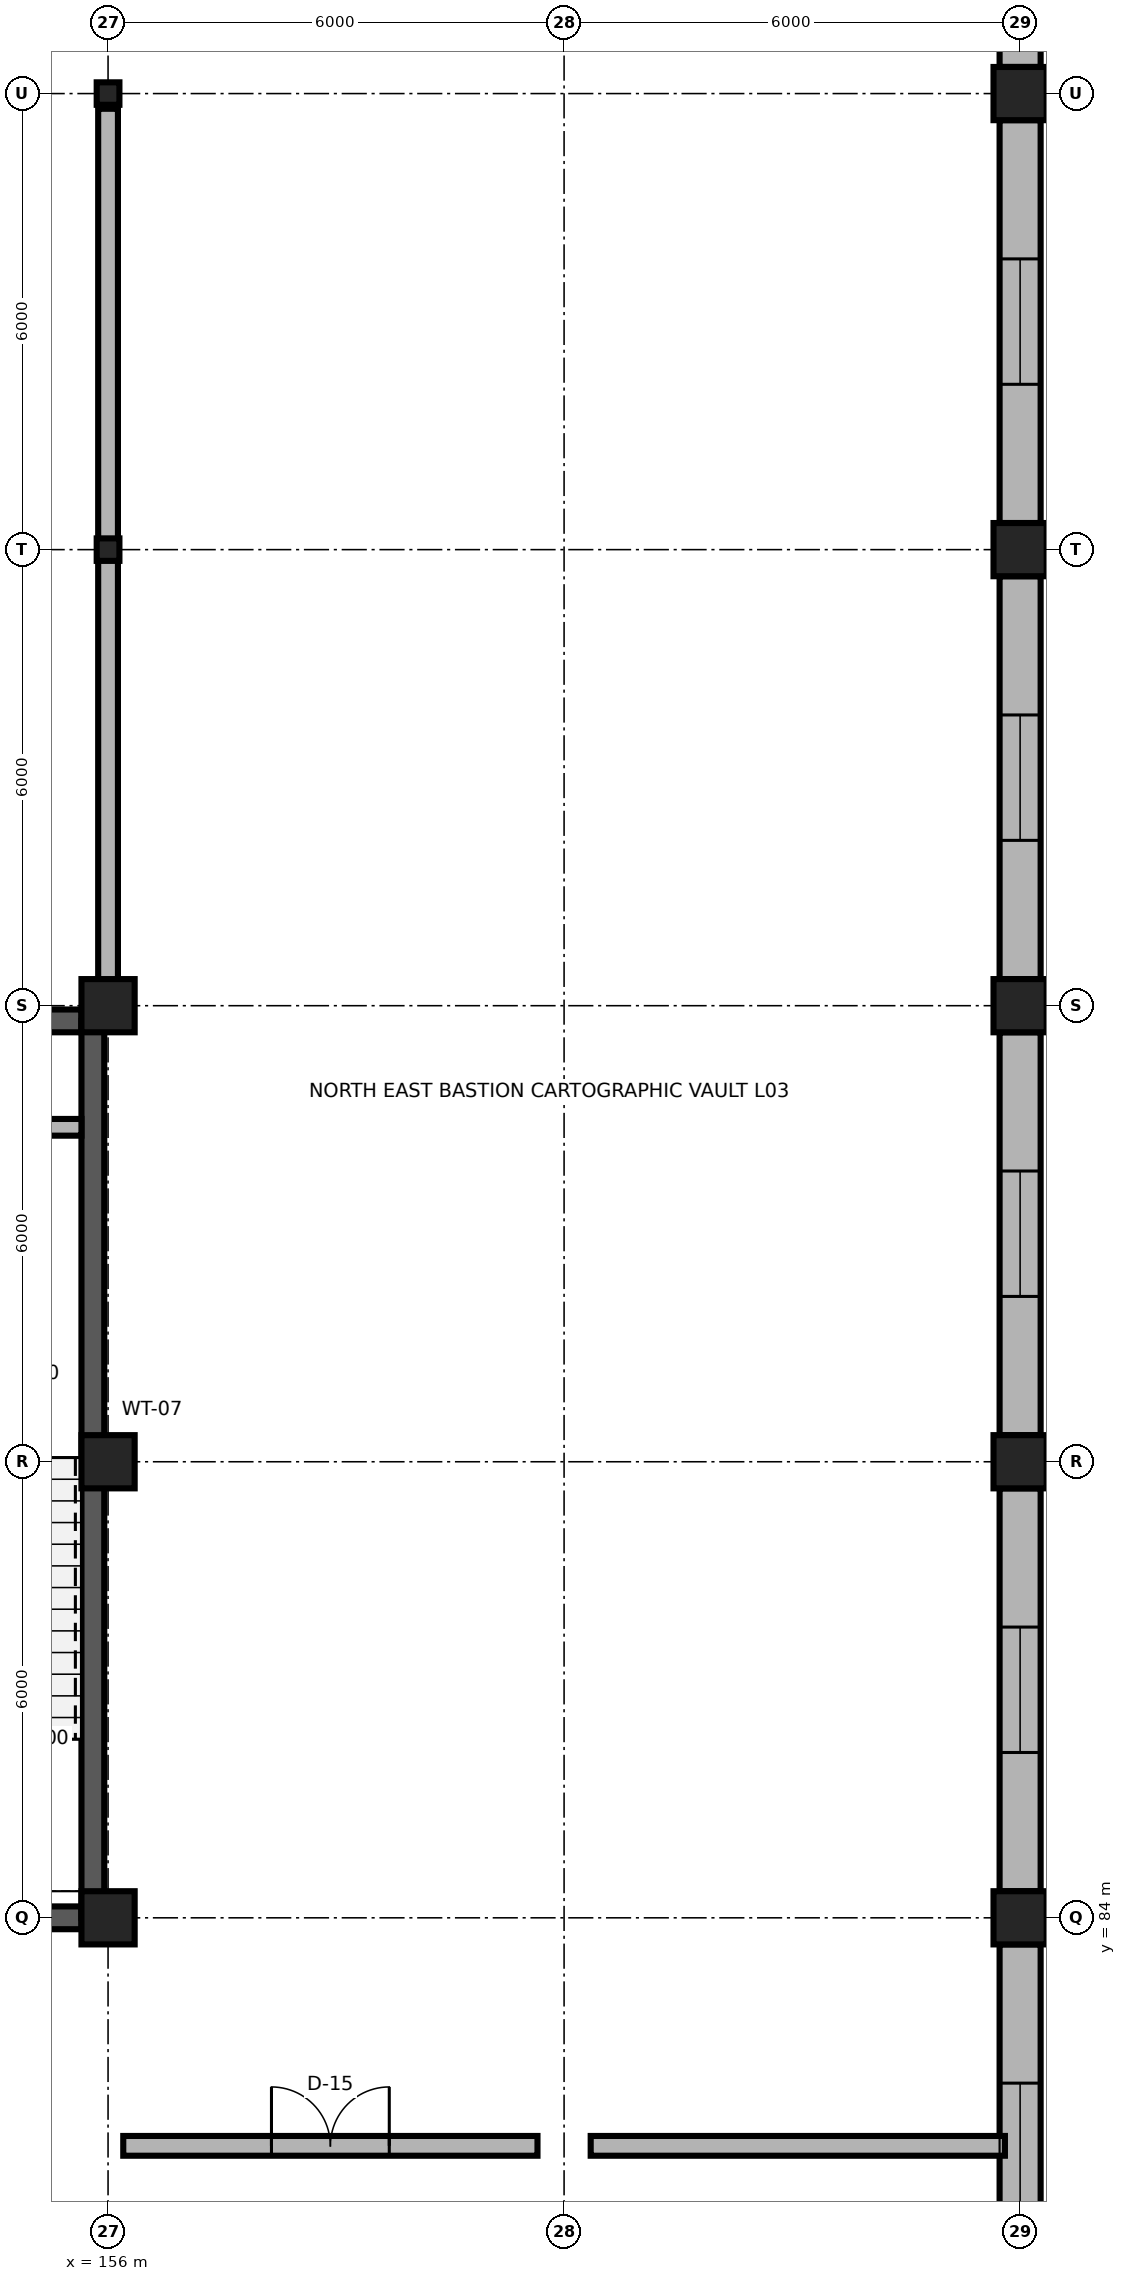
"""IFC4 building model, lengths in metres.
Left out: names, types, materials, properties, quantities, classifications, styles, units other than length and angle.
Written with IfcOpenShell. Run it as: python <this file> out.ifc"""

import sys

from ifc_helpers import new_model, si_unit, direction, frame, frame_2d, origin, origin_2d, place, context, subcontext, project, spatial, rectangle, i_section, extrude, element, fill, save


model = new_model("IFC4")
c1 = context("Model", 3, precision=1e-05, world=origin(), true_north=direction((0.0, 1.0)))
c2 = subcontext(c1, "Body", "Model", "MODEL_VIEW")
j1 = project(units=[si_unit("LENGTHUNIT", "METRE"), si_unit("PLANEANGLEUNIT", "RADIAN")], contexts=[c1])
p1 = place(None, origin())
s1 = spatial("IfcSite", under=j1, at=p1, CompositionType="ELEMENT")
p2 = place(p1, origin())
s2 = spatial("IfcBuilding", under=s1, at=p2, CompositionType="ELEMENT")
p3 = place(p2, frame((0.0, 0.0, 12.0)))
s3 = spatial("IfcBuildingStorey", under=s2, at=p3, CompositionType="ELEMENT", Elevation=12.0)
for number, where, z_axis, x_axis in (
    (1, (156.0, 84.0, 0.0), (0.0, 0.0, 1.0), (1.0, 0.0, 0.0)),
    (2, (168.0, 84.0, 0.0), (0.0, 0.0, 1.0), (1.0, 0.0, 0.0)),
    (3, (156.0, 90.0, 0.0), (0.0, 0.0, 1.0), (1.0, 0.0, 0.0)),
    (4, (168.0, 90.0, 0.0), (0.0, 0.0, 1.0), (1.0, 0.0, 0.0)),
    (5, (156.0, 96.0, 0.0), (0.0, 0.0, 1.0), (1.0, 0.0, 0.0)),
    (6, (168.0, 96.0, 0.0), (0.0, 0.0, 1.0), (1.0, 0.0, 0.0)),
):
    element("IfcColumn", number, at=place(p3, frame(where, z_axis=z_axis, x_axis=x_axis)), inside=s3, PredefinedType="COLUMN", context=c2, shape_type="SweptSolid", body=[
        extrude(rectangle(XDim=0.7, YDim=0.7, at=origin_2d()), origin(), (0.0, 0.0, 1.0), 4.5),
    ])
p4 = place(p3, frame((156.0, 102.0, 0.0), z_axis=(0.0, 0.0, 1.0), x_axis=(1.0, 0.0, 0.0)))
e7 = element("IfcColumn", 7, at=p4, inside=s3, PredefinedType="COLUMN", context=c2, shape_type="SweptSolid", body=[
    extrude(i_section(OverallWidth=0.299, OverallDepth=0.296, WebThickness=0.009, FlangeThickness=0.014, FilletRadius=0.018, at=origin_2d()), origin(), (0.0, 0.0, 1.0), 4.5),
])
p5 = place(p3, frame((168.0, 102.0, 0.0), z_axis=(0.0, 0.0, 1.0), x_axis=(1.0, 0.0, 0.0)))
e8 = element("IfcColumn", 8, at=p5, inside=s3, PredefinedType="COLUMN", context=c2, shape_type="SweptSolid", body=[
    extrude(rectangle(XDim=0.7, YDim=0.7, at=origin_2d()), origin(), (0.0, 0.0, 1.0), 4.5),
])
p6 = place(p3, frame((156.0, 108.0, 0.0), z_axis=(0.0, 0.0, 1.0), x_axis=(1.0, 0.0, 0.0)))
e9 = element("IfcColumn", 9, at=p6, inside=s3, PredefinedType="COLUMN", context=c2, shape_type="SweptSolid", body=[
    extrude(i_section(OverallWidth=0.299, OverallDepth=0.296, WebThickness=0.009, FlangeThickness=0.014, FilletRadius=0.018, at=origin_2d()), origin(), (0.0, 0.0, 1.0), 4.5),
])
p7 = place(p3, frame((168.0, 108.0, 0.0), z_axis=(0.0, 0.0, 1.0), x_axis=(1.0, 0.0, 0.0)))
e10 = element("IfcColumn", 10, at=p7, inside=s3, PredefinedType="COLUMN", context=c2, shape_type="SweptSolid", body=[
    extrude(rectangle(XDim=0.7, YDim=0.7, at=origin_2d()), origin(), (0.0, 0.0, 1.0), 4.5),
])
p8 = place(p3, frame((168.0, 78.35, 0.0), z_axis=(0.0, 0.0, 1.0), x_axis=(0.0, 1.0, 0.0)))
e11 = element("IfcWall", 11, at=p8, inside=s3, PredefinedType="SOLIDWALL", context=c2, shape_type="SweptSolid", body=[
    extrude(rectangle(XDim=5.3, YDim=0.54, at=frame_2d((2.65, 0.0))), origin(), (0.0, 0.0, 1.0), 3.77),
])
p9 = place(p8, frame((1.825, 0.0, 0.85)))
e12 = element("IfcOpeningElement", 12, at=p9, cuts=e11, PredefinedType="OPENING", context=c2, shape_type="SweptSolid", body=[
    extrude(rectangle(XDim=1.65, YDim=2.3, at=frame_2d((0.825, 1.15))), frame((0.0, 0.285, 0.0), z_axis=(0.0, -1.0, 0.0), x_axis=(1.0, 0.0, 0.0)), (0.0, 0.0, 1.0), 0.57),
])
p10 = place(p3, frame((168.0, 84.35, 0.0), z_axis=(0.0, 0.0, 1.0), x_axis=(0.0, 1.0, 0.0)))
e13 = element("IfcWall", 13, at=p10, inside=s3, PredefinedType="SOLIDWALL", context=c2, shape_type="SweptSolid", body=[
    extrude(rectangle(XDim=5.3, YDim=0.54, at=frame_2d((2.65, 0.0))), origin(), (0.0, 0.0, 1.0), 3.77),
])
p11 = place(p10, frame((1.825, 0.0, 0.85)))
e14 = element("IfcOpeningElement", 14, at=p11, cuts=e13, PredefinedType="OPENING", context=c2, shape_type="SweptSolid", body=[
    extrude(rectangle(XDim=1.65, YDim=2.3, at=frame_2d((0.825, 1.15))), frame((0.0, 0.285, 0.0), z_axis=(0.0, -1.0, 0.0), x_axis=(1.0, 0.0, 0.0)), (0.0, 0.0, 1.0), 0.57),
])
p12 = place(p3, frame((168.0, 90.35, 0.0), z_axis=(0.0, 0.0, 1.0), x_axis=(0.0, 1.0, 0.0)))
e15 = element("IfcWall", 15, at=p12, inside=s3, PredefinedType="SOLIDWALL", context=c2, shape_type="SweptSolid", body=[
    extrude(rectangle(XDim=5.3, YDim=0.54, at=frame_2d((2.65, 0.0))), origin(), (0.0, 0.0, 1.0), 3.77),
])
p13 = place(p12, frame((1.825, 0.0, 0.85)))
e16 = element("IfcOpeningElement", 16, at=p13, cuts=e15, PredefinedType="OPENING", context=c2, shape_type="SweptSolid", body=[
    extrude(rectangle(XDim=1.65, YDim=2.3, at=frame_2d((0.825, 1.15))), frame((0.0, 0.285, 0.0), z_axis=(0.0, -1.0, 0.0), x_axis=(1.0, 0.0, 0.0)), (0.0, 0.0, 1.0), 0.57),
])
p14 = place(p3, frame((168.0, 96.35, 0.0), z_axis=(0.0, 0.0, 1.0), x_axis=(0.0, 1.0, 0.0)))
e17 = element("IfcWall", 17, at=p14, inside=s3, PredefinedType="SOLIDWALL", context=c2, shape_type="SweptSolid", body=[
    extrude(rectangle(XDim=5.3, YDim=0.54, at=frame_2d((2.65, 0.0))), origin(), (0.0, 0.0, 1.0), 3.77),
])
p15 = place(p14, frame((1.825, 0.0, 0.85)))
e18 = element("IfcOpeningElement", 18, at=p15, cuts=e17, PredefinedType="OPENING", context=c2, shape_type="SweptSolid", body=[
    extrude(rectangle(XDim=1.65, YDim=2.3, at=frame_2d((0.825, 1.15))), frame((0.0, 0.285, 0.0), z_axis=(0.0, -1.0, 0.0), x_axis=(1.0, 0.0, 0.0)), (0.0, 0.0, 1.0), 0.57),
])
p16 = place(p3, frame((168.0, 102.35, 0.0), z_axis=(0.0, 0.0, 1.0), x_axis=(0.0, 1.0, 0.0)))
e19 = element("IfcWall", 19, at=p16, inside=s3, PredefinedType="SOLIDWALL", context=c2, shape_type="SweptSolid", body=[
    extrude(rectangle(XDim=5.3, YDim=0.54, at=frame_2d((2.65, 0.0))), origin(), (0.0, 0.0, 1.0), 3.77),
])
p17 = place(p16, frame((1.825, 0.0, 0.85)))
e20 = element("IfcOpeningElement", 20, at=p17, cuts=e19, PredefinedType="OPENING", context=c2, shape_type="SweptSolid", body=[
    extrude(rectangle(XDim=1.65, YDim=2.3, at=frame_2d((0.825, 1.15))), frame((0.0, 0.285, 0.0), z_axis=(0.0, -1.0, 0.0), x_axis=(1.0, 0.0, 0.0)), (0.0, 0.0, 1.0), 0.57),
])
p18 = place(p3, frame((168.0, 108.35, 0.0), z_axis=(0.0, 0.0, 1.0), x_axis=(0.0, 1.0, 0.0)))
e21 = element("IfcWall", 21, at=p18, inside=s3, PredefinedType="SOLIDWALL", context=c2, shape_type="SweptSolid", body=[
    extrude(rectangle(XDim=5.3, YDim=0.54, at=frame_2d((2.65, 0.0))), origin(), (0.0, 0.0, 1.0), 3.77),
])
p19 = place(p18, frame((1.925, 0.0, 0.85)))
e22 = element("IfcOpeningElement", 22, at=p19, cuts=e21, PredefinedType="OPENING", context=c2, shape_type="SweptSolid", body=[
    extrude(rectangle(XDim=1.45, YDim=2.15, at=frame_2d((0.725, 1.075))), frame((0.0, 0.285, 0.0), z_axis=(0.0, -1.0, 0.0), x_axis=(1.0, 0.0, 0.0)), (0.0, 0.0, 1.0), 0.57),
])
p20 = place(p3, frame((150.35, 84.0, 0.0), z_axis=(0.0, 0.0, 1.0), x_axis=(1.0, 0.0, 0.0)))
e23 = element("IfcWall", 23, at=p20, inside=s3, PredefinedType="SHEAR", context=c2, shape_type="SweptSolid", body=[
    extrude(rectangle(XDim=5.3, YDim=0.3, at=frame_2d((2.65, 0.0))), origin(), (0.0, 0.0, 1.0), 4.22),
])
p21 = place(p20, frame((1.925, 0.0, 0.0)))
e24 = element("IfcOpeningElement", 24, at=p21, cuts=e23, PredefinedType="OPENING", context=c2, shape_type="SweptSolid", body=[
    extrude(rectangle(XDim=1.45, YDim=2.25, at=frame_2d((0.725, 1.125))), frame((0.0, 0.165, 0.0), z_axis=(0.0, -1.0, 0.0), x_axis=(1.0, 0.0, 0.0)), (0.0, 0.0, 1.0), 0.33),
])
p22 = place(p3, frame((150.35, 95.8, 0.0), z_axis=(0.0, 0.0, 1.0), x_axis=(1.0, 0.0, 0.0)))
e25 = element("IfcWall", 25, at=p22, inside=s3, PredefinedType="SHEAR", context=c2, shape_type="SweptSolid", body=[
    extrude(rectangle(XDim=5.3, YDim=0.3, at=frame_2d((2.65, 0.0))), origin(), (0.0, 0.0, 1.0), 4.22),
])
p23 = place(p3, frame((155.8, 84.0, 0.0), z_axis=(0.0, 0.0, 1.0), x_axis=(0.0, 1.0, 0.0)))
e26 = element("IfcWall", 26, at=p23, inside=s3, PredefinedType="SHEAR", context=c2, shape_type="SweptSolid", body=[
    extrude(rectangle(XDim=11.8, YDim=0.3, at=frame_2d((5.9, 0.0))), origin(), (0.0, 0.0, 1.0), 4.22),
])
p24 = place(p3, frame((154.55, 94.4, 0.0), z_axis=(0.0, 0.0, 1.0), x_axis=(1.0, 0.0, 0.0)))
e27 = element("IfcWall", 27, at=p24, inside=s3, PredefinedType="PARTITIONING", context=c2, shape_type="SweptSolid", body=[
    extrude(rectangle(XDim=1.1, YDim=0.22, at=frame_2d((0.55, 0.0))), origin(), (0.0, 0.0, 1.0), 4.22),
])
p25 = place(p3, frame((156.2, 81.0, 0.0), z_axis=(0.0, 0.0, 1.0), x_axis=(1.0, 0.0, 0.0)))
e28 = element("IfcWall", 28, at=p25, inside=s3, PredefinedType="PARTITIONING", context=c2, shape_type="SweptSolid", body=[
    extrude(rectangle(XDim=5.45, YDim=0.26, at=frame_2d((2.725, 0.0))), origin(), (0.0, 0.0, 1.0), 4.22),
])
p26 = place(p25, frame((1.95, 0.0, 0.0)))
e29 = element("IfcOpeningElement", 29, at=p26, cuts=e28, PredefinedType="OPENING", context=c2, shape_type="SweptSolid", body=[
    extrude(rectangle(XDim=1.55, YDim=2.3, at=frame_2d((0.775, 1.15))), frame((0.0, 0.145, 0.0), z_axis=(0.0, -1.0, 0.0), x_axis=(1.0, 0.0, 0.0)), (0.0, 0.0, 1.0), 0.29),
])
p27 = place(p3, frame((162.35, 81.0, 0.0), z_axis=(0.0, 0.0, 1.0), x_axis=(1.0, 0.0, 0.0)))
e30 = element("IfcWall", 30, at=p27, inside=s3, PredefinedType="PARTITIONING", context=c2, shape_type="SweptSolid", body=[
    extrude(rectangle(XDim=5.45, YDim=0.26, at=frame_2d((2.725, 0.0))), origin(), (0.0, 0.0, 1.0), 4.22),
])
p28 = place(p3, frame((156.0, 96.2, 0.0), z_axis=(0.0, 0.0, 1.0), x_axis=(0.0, 1.0, 0.0)))
e31 = element("IfcWall", 31, at=p28, inside=s3, PredefinedType="PARTITIONING", context=c2, shape_type="SweptSolid", body=[
    extrude(rectangle(XDim=11.6, YDim=0.26, at=frame_2d((5.8, 0.0))), origin(), (0.0, 0.0, 1.0), 3.738),
])
p29 = place(p9, origin())
e32 = element("IfcWindow", 32, at=p29, inside=s3, PartitioningType="SINGLE_PANEL", PredefinedType="WINDOW", context=c2, shape_type="SweptSolid", body=[
    extrude(rectangle(XDim=1.65, YDim=2.3, at=frame_2d((0.825, 1.15))), frame((0.0, 0.03, 0.0), z_axis=(0.0, -1.0, 0.0), x_axis=(1.0, 0.0, 0.0)), (0.0, 0.0, 1.0), 0.06),
])
fill(e12, e32)
p30 = place(p11, origin())
e33 = element("IfcWindow", 33, at=p30, inside=s3, PartitioningType="SINGLE_PANEL", PredefinedType="WINDOW", context=c2, shape_type="SweptSolid", body=[
    extrude(rectangle(XDim=1.65, YDim=2.3, at=frame_2d((0.825, 1.15))), frame((0.0, 0.03, 0.0), z_axis=(0.0, -1.0, 0.0), x_axis=(1.0, 0.0, 0.0)), (0.0, 0.0, 1.0), 0.06),
])
fill(e14, e33)
p31 = place(p13, origin())
e34 = element("IfcWindow", 34, at=p31, inside=s3, PartitioningType="SINGLE_PANEL", PredefinedType="WINDOW", context=c2, shape_type="SweptSolid", body=[
    extrude(rectangle(XDim=1.65, YDim=2.3, at=frame_2d((0.825, 1.15))), frame((0.0, 0.03, 0.0), z_axis=(0.0, -1.0, 0.0), x_axis=(1.0, 0.0, 0.0)), (0.0, 0.0, 1.0), 0.06),
])
fill(e16, e34)
p32 = place(p15, origin())
e35 = element("IfcWindow", 35, at=p32, inside=s3, PartitioningType="SINGLE_PANEL", PredefinedType="WINDOW", context=c2, shape_type="SweptSolid", body=[
    extrude(rectangle(XDim=1.65, YDim=2.3, at=frame_2d((0.825, 1.15))), frame((0.0, 0.03, 0.0), z_axis=(0.0, -1.0, 0.0), x_axis=(1.0, 0.0, 0.0)), (0.0, 0.0, 1.0), 0.06),
])
fill(e18, e35)
p33 = place(p17, origin())
e36 = element("IfcWindow", 36, at=p33, inside=s3, PartitioningType="SINGLE_PANEL", PredefinedType="WINDOW", context=c2, shape_type="SweptSolid", body=[
    extrude(rectangle(XDim=1.65, YDim=2.3, at=frame_2d((0.825, 1.15))), frame((0.0, 0.03, 0.0), z_axis=(0.0, -1.0, 0.0), x_axis=(1.0, 0.0, 0.0)), (0.0, 0.0, 1.0), 0.06),
])
fill(e20, e36)
p34 = place(p26, origin())
e37 = element("IfcDoor", 37, at=p34, inside=s3, OperationType="DOUBLE_DOOR_SINGLE_SWING", PredefinedType="DOOR", context=c2, shape_type="SweptSolid", body=[
    extrude(rectangle(XDim=1.55, YDim=2.3, at=frame_2d((0.775, 1.15))), frame((0.0, 0.025, 0.0), z_axis=(0.0, -1.0, 0.0), x_axis=(1.0, 0.0, 0.0)), (0.0, 0.0, 1.0), 0.05),
])
fill(e29, e37)
save(model, sys.argv[1])
